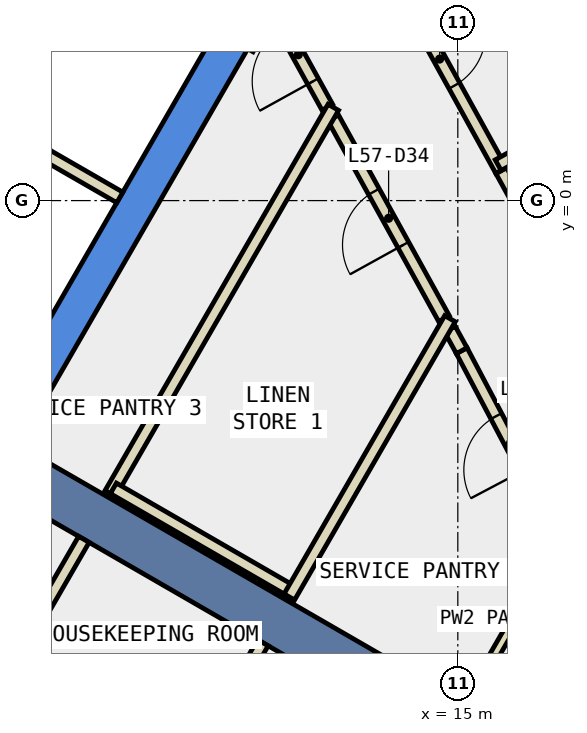
"""IFC4 building model, lengths in metres.
Left out: names, types, materials, properties, quantities, classifications, styles, units other than length and angle.
Written with IfcOpenShell. Run it as: python <this file> out.ifc"""

import sys

from ifc_helpers import new_model, si_unit, direction, frame, frame_2d, origin, place, context, subcontext, project, spatial, polyline, rectangle, outline, extrude, element, fill, save


model = new_model("IFC4")
c1 = context("Model", 3, precision=1e-05, world=origin(), true_north=direction((0.0, 1.0)))
c2 = subcontext(c1, "Body", "Model", "MODEL_VIEW")
j1 = project(units=[si_unit("LENGTHUNIT", "METRE"), si_unit("PLANEANGLEUNIT", "RADIAN")], contexts=[c1])
p1 = place(None, origin())
s1 = spatial("IfcSite", under=j1, at=p1, CompositionType="ELEMENT")
p2 = place(p1, origin())
s2 = spatial("IfcBuilding", under=s1, at=p2, CompositionType="ELEMENT")
p3 = place(p2, frame((0.0, 0.0, 252.2)))
s3 = spatial("IfcBuildingStorey", under=s2, at=p3, CompositionType="ELEMENT", Elevation=252.2)
p4 = place(p3, frame((0.0, 0.0, -0.34)))
e1 = element("IfcWall", 1, at=p4, inside=s3, PredefinedType="SHEAR", context=c2, shape_type="SweptSolid", body=[
    extrude(outline(polyline([(5.774, -7.5), (11.547, 2.5), (10.854, 2.5), (5.427, -6.9), (5.774, -7.5)])), origin(), (0.0, 0.0, 1.0), 3.6),
])
p5 = place(p3, frame((7.578, -4.375, -0.34), z_axis=(0.0, 0.0, 1.0), x_axis=(0.866024315419, -0.5000018851, 0.0)))
e2 = element("IfcWall", 2, at=p5, inside=s3, PredefinedType="SHEAR", context=c2, shape_type="SweptSolid", body=[
    extrude(rectangle(XDim=9.0, YDim=0.8, at=frame_2d((4.5, 0.0))), origin(), (0.0, 0.0, 1.0), 3.6),
])
p6 = place(p3, frame((12.854, 1.535, 0.0), z_axis=(0.0, 0.0, 1.0), x_axis=(-0.483730980407, 0.875216738068, 0.0)))
e3 = element("IfcWall", 3, at=p6, inside=s3, PredefinedType="PARTITIONING", context=c2, shape_type="SweptSolid", body=[
    extrude(rectangle(XDim=1.974, YDim=0.2, at=frame_2d((0.987, 0.0))), origin(), (0.0, 0.0, 1.0), 3.26),
])
p7 = place(p6, frame((0.487, 0.0, 0.0)))
e4 = element("IfcOpeningElement", 4, at=p7, cuts=e3, PredefinedType="OPENING", context=c2, shape_type="SweptSolid", body=[
    extrude(rectangle(XDim=1.0, YDim=2.1, at=frame_2d((0.5, 1.05))), frame((0.0, 0.11, 0.0), z_axis=(0.0, -1.0, 0.0), x_axis=(1.0, 0.0, 0.0)), (0.0, 0.0, 1.0), 0.22),
])
p8 = place(p3, frame((11.893, 3.097, 0.0), z_axis=(0.0, 0.0, 1.0), x_axis=(-0.500911294014, -0.865498628265, 0.0)))
e5 = element("IfcWall", 5, at=p8, inside=s3, PredefinedType="PARTITIONING", context=c2, shape_type="SweptSolid", body=[
    extrude(rectangle(XDim=0.693, YDim=0.2, at=frame_2d((0.347, 0.0))), origin(), (0.0, 0.0, 1.0), 3.26),
])
p9 = place(p3, frame((14.773, -1.941, 0.0), z_axis=(0.0, 0.0, 1.0), x_axis=(-0.483431586589, 0.875382145744, 0.0)))
e6 = element("IfcWall", 6, at=p9, inside=s3, PredefinedType="PARTITIONING", context=c2, shape_type="SweptSolid", body=[
    extrude(rectangle(XDim=3.771, YDim=0.2, at=frame_2d((1.885, 0.0))), origin(), (0.0, 0.0, 1.0), 3.26),
])
p10 = place(p9, frame((1.385, 0.0, 0.0)))
e7 = element("IfcOpeningElement", 7, at=p10, cuts=e6, PredefinedType="OPENING", context=c2, shape_type="SweptSolid", body=[
    extrude(rectangle(XDim=1.0, YDim=2.1, at=frame_2d((0.5, 1.05))), frame((0.0, 0.11, 0.0), z_axis=(0.0, -1.0, 0.0), x_axis=(1.0, 0.0, 0.0)), (0.0, 0.0, 1.0), 0.22),
])
p11 = place(p3, frame((16.667, -5.505, 0.0), z_axis=(0.0, 0.0, 1.0), x_axis=(-0.466812680399, 0.884356218624, 0.0)))
e8 = element("IfcWall", 8, at=p11, inside=s3, PredefinedType="PARTITIONING", context=c2, shape_type="SweptSolid", body=[
    extrude(rectangle(XDim=3.434, YDim=0.2, at=frame_2d((1.717, 0.0))), origin(), (0.0, 0.0, 1.0), 3.26),
])
p12 = place(p11, frame((1.217, 0.0, 0.0)))
e9 = element("IfcOpeningElement", 9, at=p12, cuts=e8, PredefinedType="OPENING", context=c2, shape_type="SweptSolid", body=[
    extrude(rectangle(XDim=1.0, YDim=2.1, at=frame_2d((0.5, 1.05))), frame((0.0, 0.11, 0.0), z_axis=(0.0, -1.0, 0.0), x_axis=(1.0, 0.0, 0.0)), (0.0, 0.0, 1.0), 0.22),
])
p13 = place(p3, frame((15.064, -2.468, 0.0), z_axis=(0.0, 0.0, 1.0), x_axis=(-0.482338449744, 0.875984942735, 0.0)))
e10 = element("IfcWall", 10, at=p13, inside=s3, PredefinedType="PARTITIONING", context=c2, shape_type="SweptSolid", body=[
    extrude(rectangle(XDim=0.402, YDim=0.2, at=frame_2d((0.201, 0.0))), origin(), (0.0, 0.0, 1.0), 3.26),
])
p14 = place(p3, frame((13.641, 4.246, 0.0), z_axis=(0.0, 0.0, 1.0), x_axis=(0.483405752983, -0.875396411909, 0.0)))
e11 = element("IfcWall", 11, at=p14, inside=s3, PredefinedType="PARTITIONING", context=c2, shape_type="SweptSolid", body=[
    extrude(rectangle(XDim=4.284, YDim=0.2, at=frame_2d((2.142, 0.0))), origin(), (0.0, 0.0, 1.0), 3.26),
])
p15 = place(p14, frame((1.692, 0.0, 0.0)))
e12 = element("IfcOpeningElement", 12, at=p15, cuts=e11, PredefinedType="OPENING", context=c2, shape_type="SweptSolid", body=[
    extrude(rectangle(XDim=1.0, YDim=2.1, at=frame_2d((0.5, 1.05))), frame((0.0, 0.11, 0.0), z_axis=(0.0, -1.0, 0.0), x_axis=(1.0, 0.0, 0.0)), (0.0, 0.0, 1.0), 0.22),
])
p16 = place(p3, frame((15.715, 0.491, 0.0), z_axis=(0.0, 0.0, 1.0), x_axis=(0.483421428323, -0.875387755591, 0.0)))
e13 = element("IfcWall", 13, at=p16, inside=s3, PredefinedType="PARTITIONING", context=c2, shape_type="SweptSolid", body=[
    extrude(rectangle(XDim=2.194, YDim=0.2, at=frame_2d((1.097, 0.0))), origin(), (0.0, 0.0, 1.0), 3.26),
])
p17 = place(p3, frame((8.141, 0.801, 0.0), z_axis=(0.0, 0.0, 1.0), x_axis=(0.866434738017, -0.499290341141, 0.0)))
e14 = element("IfcWall", 14, at=p17, inside=s3, PredefinedType="PARTITIONING", context=c2, shape_type="SweptSolid", body=[
    extrude(rectangle(XDim=1.5, YDim=0.2, at=frame_2d((0.75, 0.0))), origin(), (0.0, 0.0, 1.0), 3.26),
])
p18 = place(p3, frame((7.8, -7.39, 0.0), z_axis=(0.0, 0.0, 1.0), x_axis=(0.499977374825, 0.866038466041, 0.0)))
e15 = element("IfcWall", 15, at=p18, inside=s3, PredefinedType="PARTITIONING", context=c2, shape_type="SweptSolid", body=[
    extrude(rectangle(XDim=2.1, YDim=0.2, at=frame_2d((1.05, 0.0))), origin(), (0.0, 0.0, 1.0), 3.26),
])
p19 = place(p3, frame((9.285, -4.818, 0.0), z_axis=(0.0, 0.0, 1.0), x_axis=(0.499962569651, 0.866047013128, 0.0)))
e16 = element("IfcWall", 16, at=p19, inside=s3, PredefinedType="PARTITIONING", context=c2, shape_type="SweptSolid", body=[
    extrude(rectangle(XDim=7.334, YDim=0.2, at=frame_2d((3.667, 0.0))), origin(), (0.0, 0.0, 1.0), 3.26),
])
p20 = place(p3, frame((9.335, -4.732, 0.0), z_axis=(0.0, 0.0, 1.0), x_axis=(0.866002606077, -0.500039484709, 0.0)))
e17 = element("IfcWall", 17, at=p20, inside=s3, PredefinedType="PARTITIONING", context=c2, shape_type="SweptSolid", body=[
    extrude(rectangle(XDim=3.4, YDim=0.2, at=frame_2d((1.7, 0.0))), origin(), (0.0, 0.0, 1.0), 3.26),
])
p21 = place(p3, frame((11.794, -7.271, 0.0), z_axis=(0.0, 0.0, 1.0), x_axis=(-0.499918457185, -0.866072477433, 0.0)))
e18 = element("IfcWall", 18, at=p21, inside=s3, PredefinedType="PARTITIONING", context=c2, shape_type="SweptSolid", body=[
    extrude(rectangle(XDim=5.607, YDim=0.2, at=frame_2d((2.803, 0.0))), origin(), (0.0, 0.0, 1.0), 3.26),
])
p22 = place(p3, frame((14.871, -1.942, 0.0), z_axis=(0.0, 0.0, 1.0), x_axis=(-0.50000507839, -0.866022471755, 0.0)))
e19 = element("IfcWall", 19, at=p22, inside=s3, PredefinedType="PARTITIONING", context=c2, shape_type="SweptSolid", body=[
    extrude(rectangle(XDim=5.284, YDim=0.2, at=frame_2d((2.642, 0.0))), origin(), (0.0, 0.0, 1.0), 3.26),
])
p23 = place(p3, frame((16.752, -5.485, 0.0), z_axis=(0.0, 0.0, 1.0), x_axis=(-0.499988848364, -0.866031842089, 0.0)))
e20 = element("IfcWall", 20, at=p23, inside=s3, PredefinedType="PARTITIONING", context=c2, shape_type="SweptSolid", body=[
    extrude(rectangle(XDim=3.226, YDim=0.15, at=frame_2d((1.613, 0.0))), origin(), (0.0, 0.0, 1.0), 3.26),
])
p24 = place(p3, frame((17.677, 1.695, 0.0), z_axis=(0.0, 0.0, 1.0), x_axis=(-0.875306576455, -0.483568399727, 0.0)))
e21 = element("IfcWall", 21, at=p24, inside=s3, PredefinedType="PARTITIONING", context=c2, shape_type="SweptSolid", body=[
    extrude(rectangle(XDim=2.3, YDim=0.2, at=frame_2d((1.15, 0.0))), origin(), (0.0, 0.0, 1.0), 3.26),
])
p25 = place(p3, frame((4.806, 1.176, 0.0), z_axis=(0.0, 0.0, 1.0), x_axis=(0.866059941101, 0.499940174841, 0.0)))
e22 = element("IfcWall", 22, at=p25, inside=s3, PredefinedType="STANDARD", context=c2, shape_type="SweptSolid", body=[
    extrude(rectangle(XDim=4.4, YDim=0.2, at=frame_2d((2.2, 0.0))), origin(), (0.0, 0.0, 1.0), 3.26),
])
p26 = place(p25, frame((2.4, 0.0, 0.0)))
e23 = element("IfcOpeningElement", 23, at=p26, cuts=e22, PredefinedType="OPENING", context=c2, shape_type="SweptSolid", body=[
    extrude(rectangle(XDim=1.1, YDim=2.2, at=frame_2d((0.55, 1.1))), frame((0.0, 0.11, 0.0), z_axis=(0.0, -1.0, 0.0), x_axis=(1.0, 0.0, 0.0)), (0.0, 0.0, 1.0), 0.22),
])
p27 = place(p15, origin())
e24 = element("IfcDoor", 24, at=p27, inside=s3, OperationType="SINGLE_SWING_RIGHT", PredefinedType="DOOR", context=c2, shape_type="SweptSolid", body=[
    extrude(rectangle(XDim=1.0, YDim=2.1, at=frame_2d((0.5, 1.05))), frame((0.0, 0.025, 0.0), z_axis=(0.0, -1.0, 0.0), x_axis=(1.0, 0.0, 0.0)), (0.0, 0.0, 1.0), 0.05),
])
fill(e12, e24)
p28 = place(p10, origin())
e25 = element("IfcDoor", 25, at=p28, inside=s3, OperationType="SINGLE_SWING_LEFT", PredefinedType="DOOR", context=c2, shape_type="SweptSolid", body=[
    extrude(rectangle(XDim=1.0, YDim=2.1, at=frame_2d((0.5, 1.05))), frame((0.0, 0.025, 0.0), z_axis=(0.0, -1.0, 0.0), x_axis=(1.0, 0.0, 0.0)), (0.0, 0.0, 1.0), 0.05),
])
fill(e7, e25)
p29 = place(p12, origin())
e26 = element("IfcDoor", 26, at=p29, inside=s3, OperationType="SINGLE_SWING_RIGHT", PredefinedType="DOOR", context=c2, shape_type="SweptSolid", body=[
    extrude(rectangle(XDim=1.0, YDim=2.1, at=frame_2d((0.5, 1.05))), frame((0.0, 0.025, 0.0), z_axis=(0.0, -1.0, 0.0), x_axis=(1.0, 0.0, 0.0)), (0.0, 0.0, 1.0), 0.05),
])
fill(e9, e26)
p30 = place(p7, origin())
e27 = element("IfcDoor", 27, at=p30, inside=s3, OperationType="SINGLE_SWING_LEFT", PredefinedType="DOOR", context=c2, shape_type="SweptSolid", body=[
    extrude(rectangle(XDim=1.0, YDim=2.1, at=frame_2d((0.5, 1.05))), frame((0.0, 0.025, 0.0), z_axis=(0.0, -1.0, 0.0), x_axis=(1.0, 0.0, 0.0)), (0.0, 0.0, 1.0), 0.05),
])
fill(e4, e27)
save(model, sys.argv[1])
